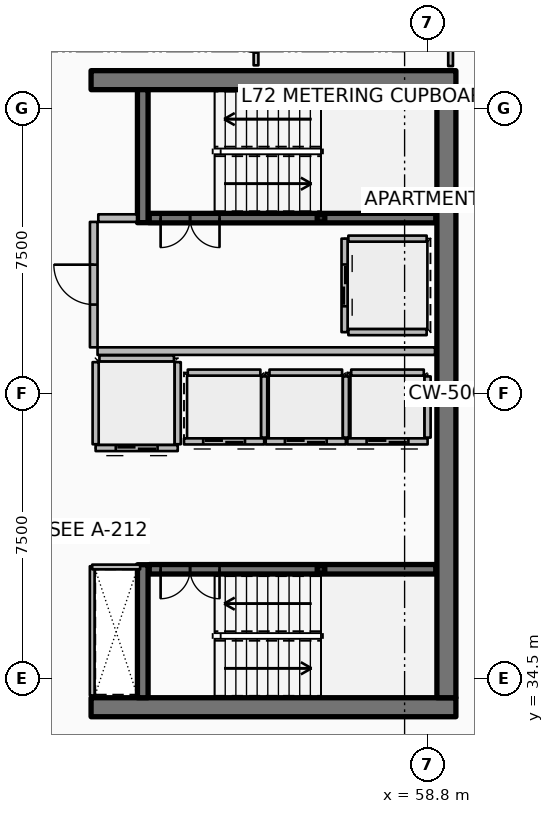
"""IFC4 building model, lengths in metres.
Left out: names, types, materials, properties, quantities, classifications, styles, units other than length and angle.
Written with IfcOpenShell. Run it as: python <this file> out.ifc"""

import sys

from ifc_helpers import new_model, si_unit, direction, frame, frame_2d, origin, origin_2d, place, context, subcontext, project, spatial, rectangle, hollow_rectangle, extrude, element, fill, save


model = new_model("IFC4")
c1 = context("Model", 3, precision=1e-05, world=origin(), true_north=direction((0.0, 1.0)))
c2 = subcontext(c1, "Body", "Model", "MODEL_VIEW")
j1 = project(units=[si_unit("LENGTHUNIT", "METRE"), si_unit("PLANEANGLEUNIT", "RADIAN")], contexts=[c1])
p1 = place(None, origin())
s1 = spatial("IfcSite", under=j1, at=p1, CompositionType="ELEMENT")
p2 = place(p1, origin())
s2 = spatial("IfcBuilding", under=s1, at=p2, CompositionType="ELEMENT")
p3 = place(p2, frame((0.0, 0.0, 286.75)))
s3 = spatial("IfcBuildingStorey", under=s2, at=p3, CompositionType="ELEMENT", Elevation=286.75)
for number, where, z_axis, x_axis in (
    (1, (49.95, 33.75, 0.0), (0.0, 0.0, 1.0), (1.0, 0.0, 0.0)),
    (2, (49.95, 50.25, 0.0), (0.0, 0.0, 1.0), (1.0, 0.0, 0.0)),
):
    element("IfcWall", number, at=place(p3, frame(where, z_axis=z_axis, x_axis=x_axis)), inside=s3, PredefinedType="SHEAR", context=c2, shape_type="SweptSolid", body=[
        extrude(rectangle(XDim=9.6, YDim=0.5, at=frame_2d((4.8, 0.0))), origin(), (0.0, 0.0, 1.0), 3.85),
    ])
p4 = place(p3, frame((59.3, 34.0, 0.0), z_axis=(0.0, 0.0, 1.0), x_axis=(0.0, 1.0, 0.0)))
e3 = element("IfcWall", 3, at=p4, inside=s3, PredefinedType="SHEAR", context=c2, shape_type="SweptSolid", body=[
    extrude(rectangle(XDim=16.0, YDim=0.5, at=frame_2d((8.0, 0.0))), origin(), (0.0, 0.0, 1.0), 3.85),
])
for number, where, z_axis, x_axis in (
    (4, (51.31, 46.5, 0.0), (0.0, 0.0, 1.0), (0.0, 1.0, 0.0)),
    (5, (51.31, 34.0, 0.0), (0.0, 0.0, 1.0), (0.0, 1.0, 0.0)),
):
    element("IfcWall", number, at=place(p3, frame(where, z_axis=z_axis, x_axis=x_axis)), inside=s3, PredefinedType="SHEAR", context=c2, shape_type="SweptSolid", body=[
        extrude(rectangle(XDim=3.5, YDim=0.28, at=frame_2d((1.75, 0.0))), origin(), (0.0, 0.0, 1.0), 3.85),
    ])
for number, where, z_axis, x_axis in (
    (6, (56.0, 46.62, 0.0), (0.0, 0.0, 1.0), (1.0, 0.0, 0.0)),
    (7, (56.0, 37.38, 0.0), (0.0, 0.0, 1.0), (1.0, 0.0, 0.0)),
):
    element("IfcColumn", number, at=place(p3, frame(where, z_axis=z_axis, x_axis=x_axis)), inside=s3, PredefinedType="COLUMN", context=c2, shape_type="SweptSolid", body=[
        extrude(hollow_rectangle(XDim=0.2, YDim=0.2, WallThickness=0.01, InnerFilletRadius=0.01, OuterFilletRadius=0.02, at=origin_2d()), origin(), (0.0, 0.0, 1.0), 1.72),
    ])
p5 = place(p3, frame((51.48, 46.62, 0.0), z_axis=(0.0, 0.0, 1.0), x_axis=(1.0, 0.0, 0.0)))
e8 = element("IfcWall", 8, at=p5, inside=s3, PredefinedType="SOLIDWALL", context=c2, shape_type="SweptSolid", body=[
    extrude(rectangle(XDim=7.54, YDim=0.25, at=frame_2d((3.77, 0.0))), origin(), (0.0, 0.0, 1.0), 3.59),
])
p6 = place(p5, frame((0.3, 0.0, 0.0)))
e9 = element("IfcOpeningElement", 9, at=p6, cuts=e8, PredefinedType="OPENING", context=c2, shape_type="SweptSolid", body=[
    extrude(rectangle(XDim=1.55, YDim=2.15, at=frame_2d((0.775, 1.075))), frame((0.0, 0.135, 0.0), z_axis=(0.0, -1.0, 0.0), x_axis=(1.0, 0.0, 0.0)), (0.0, 0.0, 1.0), 0.27),
])
p7 = place(p3, frame((51.48, 37.38, 0.0), z_axis=(0.0, 0.0, 1.0), x_axis=(1.0, 0.0, 0.0)))
e10 = element("IfcWall", 10, at=p7, inside=s3, PredefinedType="SOLIDWALL", context=c2, shape_type="SweptSolid", body=[
    extrude(rectangle(XDim=7.54, YDim=0.25, at=frame_2d((3.77, 0.0))), origin(), (0.0, 0.0, 1.0), 3.59),
])
p8 = place(p7, frame((0.3, 0.0, 0.0)))
e11 = element("IfcOpeningElement", 11, at=p8, cuts=e10, PredefinedType="OPENING", context=c2, shape_type="SweptSolid", body=[
    extrude(rectangle(XDim=1.55, YDim=2.15, at=frame_2d((0.775, 1.075))), frame((0.0, 0.135, 0.0), z_axis=(0.0, -1.0, 0.0), x_axis=(1.0, 0.0, 0.0)), (0.0, 0.0, 1.0), 0.27),
])
p9 = place(p3, frame((54.505, 40.745, 0.0), z_axis=(0.0, 0.0, 1.0), x_axis=(-1.0, 0.0, 0.0)))
e12 = element("IfcWall", 12, at=p9, inside=s3, PredefinedType="PARTITIONING", context=c2, shape_type="SweptSolid", body=[
    extrude(rectangle(XDim=2.11, YDim=0.16, at=frame_2d((1.055, 0.0))), origin(), (0.0, 0.0, 1.0), 3.59),
])
p10 = place(p9, frame((0.505, 0.0, 0.0)))
e13 = element("IfcOpeningElement", 13, at=p10, cuts=e12, PredefinedType="OPENING", context=c2, shape_type="SweptSolid", body=[
    extrude(rectangle(XDim=1.1, YDim=2.1, at=frame_2d((0.55, 1.05))), frame((0.0, 0.09, 0.0), z_axis=(0.0, -1.0, 0.0), x_axis=(1.0, 0.0, 0.0)), (0.0, 0.0, 1.0), 0.18),
])
p11 = place(p3, frame((54.505, 40.845, 0.0), z_axis=(0.0, 0.0, 1.0), x_axis=(0.0, 1.0, 0.0)))
e14 = element("IfcWall", 14, at=p11, inside=s3, PredefinedType="PARTITIONING", context=c2, shape_type="SweptSolid", body=[
    extrude(rectangle(XDim=1.61, YDim=0.16, at=frame_2d((0.805, 0.0))), origin(), (0.0, 0.0, 1.0), 3.59),
])
p12 = place(p3, frame((52.495, 42.555, 0.0), z_axis=(0.0, 0.0, 1.0), x_axis=(1.0, 0.0, 0.0)))
e15 = element("IfcWall", 15, at=p12, inside=s3, PredefinedType="PARTITIONING", context=c2, shape_type="SweptSolid", body=[
    extrude(rectangle(XDim=1.91, YDim=0.16, at=frame_2d((0.955, 0.0))), origin(), (0.0, 0.0, 1.0), 3.59),
])
p13 = place(p3, frame((56.655, 40.745, 0.0), z_axis=(0.0, 0.0, 1.0), x_axis=(-1.0, 0.0, 0.0)))
e16 = element("IfcWall", 16, at=p13, inside=s3, PredefinedType="PARTITIONING", context=c2, shape_type="SweptSolid", body=[
    extrude(rectangle(XDim=2.11, YDim=0.16, at=frame_2d((1.055, 0.0))), origin(), (0.0, 0.0, 1.0), 3.59),
])
p14 = place(p13, frame((0.505, 0.0, 0.0)))
e17 = element("IfcOpeningElement", 17, at=p14, cuts=e16, PredefinedType="OPENING", context=c2, shape_type="SweptSolid", body=[
    extrude(rectangle(XDim=1.1, YDim=2.1, at=frame_2d((0.55, 1.05))), frame((0.0, 0.09, 0.0), z_axis=(0.0, -1.0, 0.0), x_axis=(1.0, 0.0, 0.0)), (0.0, 0.0, 1.0), 0.18),
])
p15 = place(p3, frame((56.655, 40.845, 0.0), z_axis=(0.0, 0.0, 1.0), x_axis=(0.0, 1.0, 0.0)))
e18 = element("IfcWall", 18, at=p15, inside=s3, PredefinedType="PARTITIONING", context=c2, shape_type="SweptSolid", body=[
    extrude(rectangle(XDim=1.61, YDim=0.16, at=frame_2d((0.805, 0.0))), origin(), (0.0, 0.0, 1.0), 3.59),
])
p16 = place(p3, frame((54.645, 42.555, 0.0), z_axis=(0.0, 0.0, 1.0), x_axis=(1.0, 0.0, 0.0)))
e19 = element("IfcWall", 19, at=p16, inside=s3, PredefinedType="PARTITIONING", context=c2, shape_type="SweptSolid", body=[
    extrude(rectangle(XDim=1.91, YDim=0.16, at=frame_2d((0.955, 0.0))), origin(), (0.0, 0.0, 1.0), 3.59),
])
p17 = place(p3, frame((58.805, 40.745, 0.0), z_axis=(0.0, 0.0, 1.0), x_axis=(-1.0, 0.0, 0.0)))
e20 = element("IfcWall", 20, at=p17, inside=s3, PredefinedType="PARTITIONING", context=c2, shape_type="SweptSolid", body=[
    extrude(rectangle(XDim=2.11, YDim=0.16, at=frame_2d((1.055, 0.0))), origin(), (0.0, 0.0, 1.0), 3.59),
])
p18 = place(p17, frame((0.505, 0.0, 0.0)))
e21 = element("IfcOpeningElement", 21, at=p18, cuts=e20, PredefinedType="OPENING", context=c2, shape_type="SweptSolid", body=[
    extrude(rectangle(XDim=1.1, YDim=2.1, at=frame_2d((0.55, 1.05))), frame((0.0, 0.09, 0.0), z_axis=(0.0, -1.0, 0.0), x_axis=(1.0, 0.0, 0.0)), (0.0, 0.0, 1.0), 0.18),
])
p19 = place(p3, frame((58.805, 40.845, 0.0), z_axis=(0.0, 0.0, 1.0), x_axis=(0.0, 1.0, 0.0)))
e22 = element("IfcWall", 22, at=p19, inside=s3, PredefinedType="PARTITIONING", context=c2, shape_type="SweptSolid", body=[
    extrude(rectangle(XDim=1.61, YDim=0.16, at=frame_2d((0.805, 0.0))), origin(), (0.0, 0.0, 1.0), 3.59),
])
p20 = place(p3, frame((56.795, 42.555, 0.0), z_axis=(0.0, 0.0, 1.0), x_axis=(1.0, 0.0, 0.0)))
e23 = element("IfcWall", 23, at=p20, inside=s3, PredefinedType="PARTITIONING", context=c2, shape_type="SweptSolid", body=[
    extrude(rectangle(XDim=1.91, YDim=0.16, at=frame_2d((0.955, 0.0))), origin(), (0.0, 0.0, 1.0), 3.59),
])
p21 = place(p3, frame((56.62, 46.08, 0.0), z_axis=(0.0, 0.0, 1.0), x_axis=(0.0, -1.0, 0.0)))
e24 = element("IfcWall", 24, at=p21, inside=s3, PredefinedType="PARTITIONING", context=c2, shape_type="SweptSolid", body=[
    extrude(rectangle(XDim=2.46, YDim=0.16, at=frame_2d((1.23, 0.0))), origin(), (0.0, 0.0, 1.0), 3.59),
])
p22 = place(p21, frame((0.68, 0.0, 0.0)))
e25 = element("IfcOpeningElement", 25, at=p22, cuts=e24, PredefinedType="OPENING", context=c2, shape_type="SweptSolid", body=[
    extrude(rectangle(XDim=1.1, YDim=2.1, at=frame_2d((0.55, 1.05))), frame((0.0, 0.09, 0.0), z_axis=(0.0, -1.0, 0.0), x_axis=(1.0, 0.0, 0.0)), (0.0, 0.0, 1.0), 0.18),
])
for number, where, z_axis, x_axis in (
    (26, (56.72, 46.08, 0.0), (0.0, 0.0, 1.0), (1.0, 0.0, 0.0)),
    (27, (56.72, 43.62, 0.0), (0.0, 0.0, 1.0), (1.0, 0.0, 0.0)),
):
    element("IfcWall", number, at=place(p3, frame(where, z_axis=z_axis, x_axis=x_axis)), inside=s3, PredefinedType="PARTITIONING", context=c2, shape_type="SweptSolid", body=[
        extrude(rectangle(XDim=2.06, YDim=0.16, at=frame_2d((1.03, 0.0))), origin(), (0.0, 0.0, 1.0), 3.59),
    ])
p23 = place(p3, frame((52.23, 40.57, 0.0), z_axis=(0.0, 0.0, 1.0), x_axis=(-1.0, 0.0, 0.0)))
e28 = element("IfcWall", 28, at=p23, inside=s3, PredefinedType="PARTITIONING", context=c2, shape_type="SweptSolid", body=[
    extrude(rectangle(XDim=2.16, YDim=0.16, at=frame_2d((1.08, 0.0))), origin(), (0.0, 0.0, 1.0), 3.59),
])
p24 = place(p23, frame((0.53, 0.0, 0.0)))
e29 = element("IfcOpeningElement", 29, at=p24, cuts=e28, PredefinedType="OPENING", context=c2, shape_type="SweptSolid", body=[
    extrude(rectangle(XDim=1.1, YDim=2.1, at=frame_2d((0.55, 1.05))), frame((0.0, 0.09, 0.0), z_axis=(0.0, -1.0, 0.0), x_axis=(1.0, 0.0, 0.0)), (0.0, 0.0, 1.0), 0.18),
])
for number, where, z_axis, x_axis in (
    (30, (52.23, 40.67, 0.0), (0.0, 0.0, 1.0), (0.0, 1.0, 0.0)),
    (31, (50.07, 40.67, 0.0), (0.0, 0.0, 1.0), (0.0, 1.0, 0.0)),
):
    element("IfcWall", number, at=place(p3, frame(where, z_axis=z_axis, x_axis=x_axis)), inside=s3, PredefinedType="PARTITIONING", context=c2, shape_type="SweptSolid", body=[
        extrude(rectangle(XDim=2.16, YDim=0.16, at=frame_2d((1.08, 0.0))), origin(), (0.0, 0.0, 1.0), 3.59),
    ])
p25 = place(p3, frame((50.17, 42.93, 0.0), z_axis=(0.0, 0.0, 1.0), x_axis=(1.0, 0.0, 0.0)))
e32 = element("IfcWall", 32, at=p25, inside=s3, PredefinedType="PARTITIONING", context=c2, shape_type="SweptSolid", body=[
    extrude(rectangle(XDim=1.96, YDim=0.16, at=frame_2d((0.98, 0.0))), origin(), (0.0, 0.0, 1.0), 3.59),
])
p26 = place(p3, frame((50.12, 43.12, 0.0), z_axis=(0.0, 0.0, 1.0), x_axis=(1.0, 0.0, 0.0)))
e33 = element("IfcWall", 33, at=p26, inside=s3, PredefinedType="PARTITIONING", context=c2, shape_type="SweptSolid", body=[
    extrude(rectangle(XDim=8.88, YDim=0.2, at=frame_2d((4.44, 0.0))), origin(), (0.0, 0.0, 1.0), 3.59),
])
p27 = place(p3, frame((50.14, 46.62, 0.0), z_axis=(0.0, 0.0, 1.0), x_axis=(1.0, 0.0, 0.0)))
e34 = element("IfcWall", 34, at=p27, inside=s3, PredefinedType="PARTITIONING", context=c2, shape_type="SweptSolid", body=[
    extrude(rectangle(XDim=1.02, YDim=0.2, at=frame_2d((0.51, 0.0))), origin(), (0.0, 0.0, 1.0), 3.59),
])
p28 = place(p3, frame((50.02, 43.22, 0.0), z_axis=(0.0, 0.0, 1.0), x_axis=(0.0, 1.0, 0.0)))
e35 = element("IfcWall", 35, at=p28, inside=s3, PredefinedType="PARTITIONING", context=c2, shape_type="SweptSolid", body=[
    extrude(rectangle(XDim=3.3, YDim=0.2, at=frame_2d((1.65, 0.0))), origin(), (0.0, 0.0, 1.0), 3.59),
])
p29 = place(p28, frame((1.125, 0.0, 0.0)))
e36 = element("IfcOpeningElement", 36, at=p29, cuts=e35, PredefinedType="OPENING", context=c2, shape_type="SweptSolid", body=[
    extrude(rectangle(XDim=1.05, YDim=2.1, at=frame_2d((0.525, 1.05))), frame((0.0, 0.11, 0.0), z_axis=(0.0, -1.0, 0.0), x_axis=(1.0, 0.0, 0.0)), (0.0, 0.0, 1.0), 0.22),
])
p30 = place(p3, frame((49.98, 34.06, 0.0), z_axis=(0.0, 0.0, 1.0), x_axis=(0.0, 1.0, 0.0)))
e37 = element("IfcWall", 37, at=p30, inside=s3, PredefinedType="PARTITIONING", context=c2, shape_type="SweptSolid", body=[
    extrude(rectangle(XDim=3.4, YDim=0.125, at=frame_2d((1.7, 0.0))), origin(), (0.0, 0.0, 1.0), 3.03),
])
p31 = place(p3, frame((49.98, 37.44, 0.0), z_axis=(0.0, 0.0, 1.0), x_axis=(1.0, 0.0, 0.0)))
e38 = element("IfcWall", 38, at=p31, inside=s3, PredefinedType="PARTITIONING", context=c2, shape_type="SweptSolid", body=[
    extrude(rectangle(XDim=1.26, YDim=0.125, at=frame_2d((0.63, 0.0))), origin(), (0.0, 0.0, 1.0), 3.03),
])
p32 = place(p3, frame((59.41, 50.62, 0.0), z_axis=(0.0, 0.0, 1.0), x_axis=(0.0, 1.0, 0.0)))
e39 = element("IfcWall", 39, at=p32, inside=s3, PredefinedType="PARTITIONING", context=c2, shape_type="SweptSolid", body=[
    extrude(rectangle(XDim=1.54, YDim=0.125, at=frame_2d((0.77, 0.0))), origin(), (0.0, 0.0, 1.0), 3.03),
])
p33 = place(p3, frame((54.29, 50.64, 0.0), z_axis=(0.0, 0.0, 1.0), x_axis=(0.0, 1.0, 0.0)))
e40 = element("IfcWall", 40, at=p33, inside=s3, PredefinedType="PARTITIONING", context=c2, shape_type="SweptSolid", body=[
    extrude(rectangle(XDim=1.52, YDim=0.125, at=frame_2d((0.76, 0.0))), origin(), (0.0, 0.0, 1.0), 3.03),
])
p34 = place(p33, frame((0.335, 0.0, 0.0)))
e41 = element("IfcOpeningElement", 41, at=p34, cuts=e40, PredefinedType="OPENING", context=c2, shape_type="SweptSolid", body=[
    extrude(rectangle(XDim=0.85, YDim=2.06, at=frame_2d((0.425, 1.03))), frame((0.0, 0.073, 0.0), z_axis=(0.0, -1.0, 0.0), x_axis=(1.0, 0.0, 0.0)), (0.0, 0.0, 1.0), 0.145),
])
p35 = place(p6, origin())
e42 = element("IfcDoor", 42, at=p35, inside=s3, OperationType="DOUBLE_DOOR_SINGLE_SWING", PredefinedType="DOOR", context=c2, shape_type="SweptSolid", body=[
    extrude(rectangle(XDim=1.55, YDim=2.15, at=frame_2d((0.775, 1.075))), frame((0.0, 0.025, 0.0), z_axis=(0.0, -1.0, 0.0), x_axis=(1.0, 0.0, 0.0)), (0.0, 0.0, 1.0), 0.05),
])
fill(e9, e42)
p36 = place(p8, origin())
e43 = element("IfcDoor", 43, at=p36, inside=s3, OperationType="DOUBLE_DOOR_SINGLE_SWING", PredefinedType="DOOR", context=c2, shape_type="SweptSolid", body=[
    extrude(rectangle(XDim=1.55, YDim=2.15, at=frame_2d((0.775, 1.075))), frame((0.0, 0.025, 0.0), z_axis=(0.0, -1.0, 0.0), x_axis=(1.0, 0.0, 0.0)), (0.0, 0.0, 1.0), 0.05),
])
fill(e11, e43)
p37 = place(p10, origin())
e44 = element("IfcDoor", 44, at=p37, inside=s3, OperationType="DOUBLE_DOOR_SLIDING", PredefinedType="DOOR", context=c2, shape_type="SweptSolid", body=[
    extrude(rectangle(XDim=1.1, YDim=2.1, at=frame_2d((0.55, 1.05))), frame((0.0, 0.025, 0.0), z_axis=(0.0, -1.0, 0.0), x_axis=(1.0, 0.0, 0.0)), (0.0, 0.0, 1.0), 0.05),
])
fill(e13, e44)
p38 = place(p14, origin())
e45 = element("IfcDoor", 45, at=p38, inside=s3, OperationType="DOUBLE_DOOR_SLIDING", PredefinedType="DOOR", context=c2, shape_type="SweptSolid", body=[
    extrude(rectangle(XDim=1.1, YDim=2.1, at=frame_2d((0.55, 1.05))), frame((0.0, 0.025, 0.0), z_axis=(0.0, -1.0, 0.0), x_axis=(1.0, 0.0, 0.0)), (0.0, 0.0, 1.0), 0.05),
])
fill(e17, e45)
p39 = place(p18, origin())
e46 = element("IfcDoor", 46, at=p39, inside=s3, OperationType="DOUBLE_DOOR_SLIDING", PredefinedType="DOOR", context=c2, shape_type="SweptSolid", body=[
    extrude(rectangle(XDim=1.1, YDim=2.1, at=frame_2d((0.55, 1.05))), frame((0.0, 0.025, 0.0), z_axis=(0.0, -1.0, 0.0), x_axis=(1.0, 0.0, 0.0)), (0.0, 0.0, 1.0), 0.05),
])
fill(e21, e46)
p40 = place(p22, origin())
e47 = element("IfcDoor", 47, at=p40, inside=s3, OperationType="DOUBLE_DOOR_SLIDING", PredefinedType="DOOR", context=c2, shape_type="SweptSolid", body=[
    extrude(rectangle(XDim=1.1, YDim=2.1, at=frame_2d((0.55, 1.05))), frame((0.0, 0.025, 0.0), z_axis=(0.0, -1.0, 0.0), x_axis=(1.0, 0.0, 0.0)), (0.0, 0.0, 1.0), 0.05),
])
fill(e25, e47)
p41 = place(p24, origin())
e48 = element("IfcDoor", 48, at=p41, inside=s3, OperationType="DOUBLE_DOOR_SLIDING", PredefinedType="DOOR", context=c2, shape_type="SweptSolid", body=[
    extrude(rectangle(XDim=1.1, YDim=2.1, at=frame_2d((0.55, 1.05))), frame((0.0, 0.025, 0.0), z_axis=(0.0, -1.0, 0.0), x_axis=(1.0, 0.0, 0.0)), (0.0, 0.0, 1.0), 0.05),
])
fill(e29, e48)
p42 = place(p29, origin())
e49 = element("IfcDoor", 49, at=p42, inside=s3, OperationType="SINGLE_SWING_RIGHT", PredefinedType="DOOR", context=c2, shape_type="SweptSolid", body=[
    extrude(rectangle(XDim=1.05, YDim=2.1, at=frame_2d((0.525, 1.05))), frame((0.0, 0.025, 0.0), z_axis=(0.0, -1.0, 0.0), x_axis=(1.0, 0.0, 0.0)), (0.0, 0.0, 1.0), 0.05),
])
fill(e36, e49)
p43 = place(p34, origin())
e50 = element("IfcDoor", 50, at=p43, inside=s3, OperationType="SINGLE_SWING_RIGHT", PredefinedType="DOOR", context=c2, shape_type="SweptSolid", body=[
    extrude(rectangle(XDim=0.85, YDim=2.06, at=frame_2d((0.425, 1.03))), frame((0.0, 0.025, 0.0), z_axis=(0.0, -1.0, 0.0), x_axis=(1.0, 0.0, 0.0)), (0.0, 0.0, 1.0), 0.05),
])
fill(e41, e50)
save(model, sys.argv[1])
